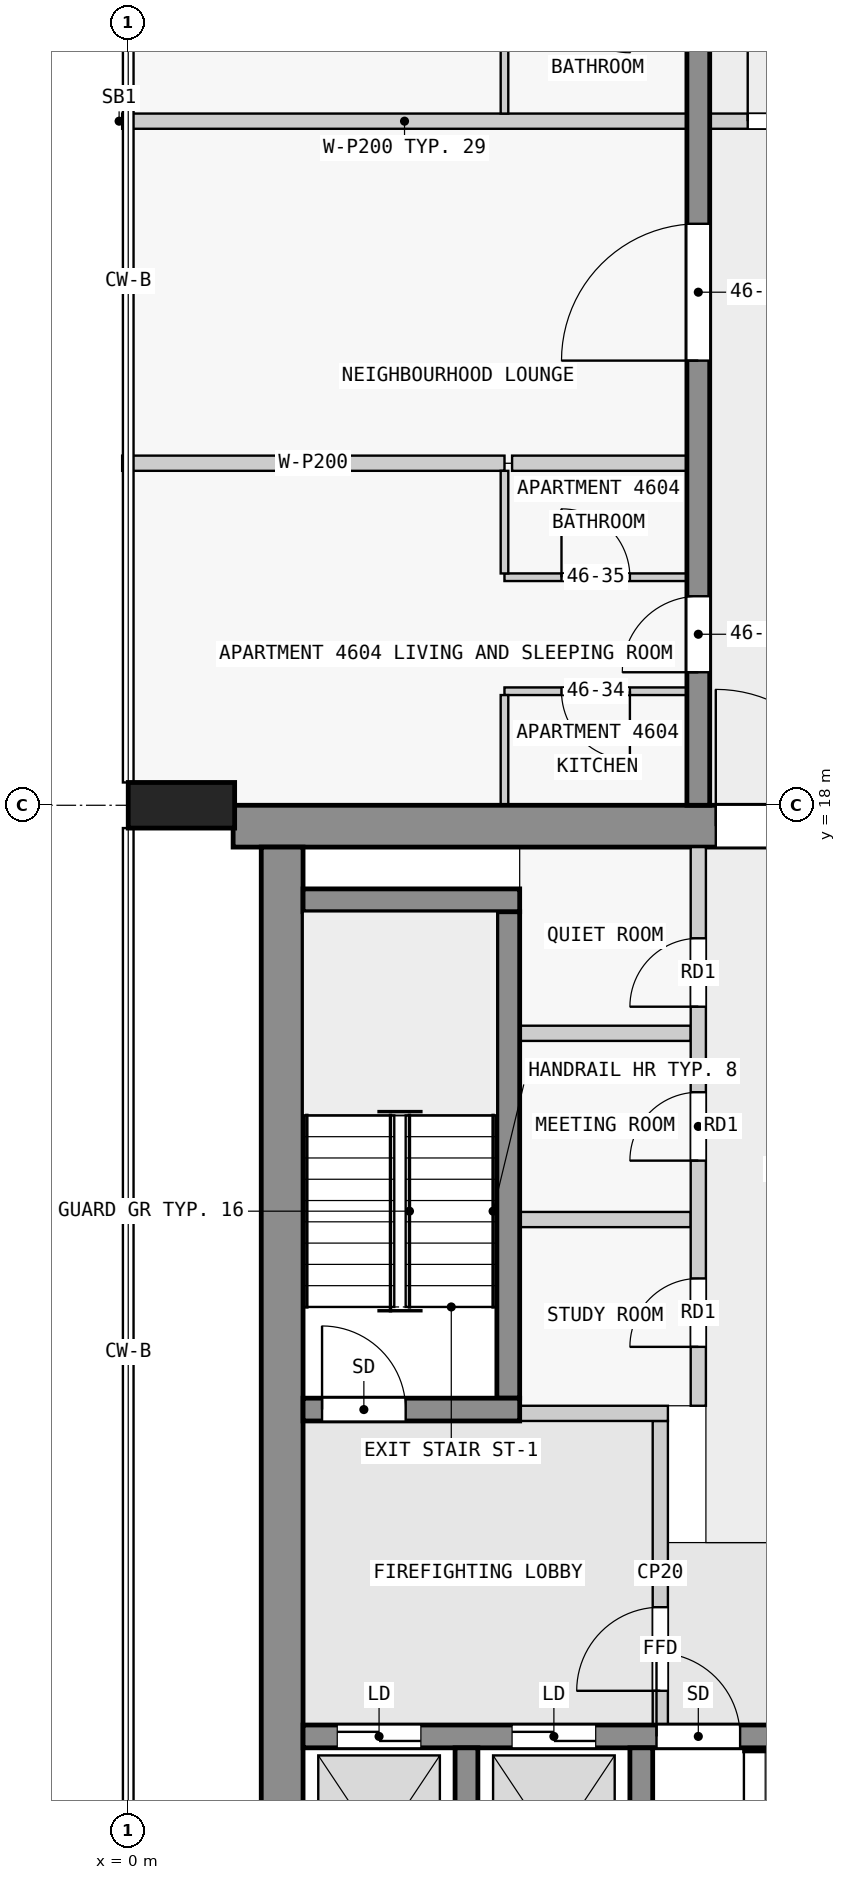
"""IFC4 building model, lengths in metres.
Left out: names, types, materials, properties, quantities, classifications, styles, units other than length and angle.
Written with IfcOpenShell. Run it as: python <this file> out.ifc"""

import sys

from ifc_helpers import new_model, si_unit, direction, frame, frame_2d, origin, origin_2d, place, context, subcontext, project, spatial, rectangle, extrude, element, fill, save


model = new_model("IFC4")
c1 = context("Model", 3, precision=1e-05, world=origin(), true_north=direction((0.0, 1.0)))
c2 = subcontext(c1, "Body", "Model", "MODEL_VIEW")
j1 = project(units=[si_unit("LENGTHUNIT", "METRE"), si_unit("PLANEANGLEUNIT", "RADIAN")], contexts=[c1])
p1 = place(None, origin())
s1 = spatial("IfcSite", under=j1, at=p1, CompositionType="ELEMENT")
p2 = place(p1, origin())
s2 = spatial("IfcBuilding", under=s1, at=p2, CompositionType="ELEMENT")
p3 = place(p2, frame((0.0, 0.0, 177.9)))
s3 = spatial("IfcBuildingStorey", under=s2, at=p3, CompositionType="ELEMENT", Elevation=177.9)
p4 = place(p3, frame((0.7, 18.0, 0.0), z_axis=(0.0, 0.0, 1.0), x_axis=(0.0, 1.0, 0.0)))
e1 = element("IfcColumn", 1, at=p4, inside=s3, PredefinedType="COLUMN", context=c2, shape_type="SweptSolid", body=[
    extrude(rectangle(XDim=0.6, YDim=1.4, at=origin_2d()), origin(), (0.0, 0.0, 1.0), 3.5),
])
p5 = place(p3, frame((1.38, 17.725, 0.0), z_axis=(0.0, 0.0, 1.0), x_axis=(1.0, 0.0, 0.0)))
e2 = element("IfcWall", 2, at=p5, inside=s3, PredefinedType="SHEAR", context=c2, shape_type="SweptSolid", body=[
    extrude(rectangle(XDim=21.12, YDim=0.55, at=frame_2d((10.56, 0.0))), origin(), (0.0, 0.0, 1.0), 3.25),
])
p6 = place(p5, frame((6.35, 0.0, 0.0)))
e3 = element("IfcOpeningElement", 3, at=p6, cuts=e2, PredefinedType="OPENING", context=c2, shape_type="SweptSolid", body=[
    extrude(rectangle(XDim=1.8, YDim=2.1, at=frame_2d((0.9, 1.05))), frame((0.0, 0.285, 0.0), z_axis=(0.0, -1.0, 0.0), x_axis=(1.0, 0.0, 0.0)), (0.0, 0.0, 1.0), 0.57),
])
p7 = place(p3, frame((2.025, 2.5, 0.0), z_axis=(0.0, 0.0, 1.0), x_axis=(0.0, 1.0, 0.0)))
e4 = element("IfcWall", 4, at=p7, inside=s3, PredefinedType="SHEAR", context=c2, shape_type="SweptSolid", body=[
    extrude(rectangle(XDim=14.95, YDim=0.55, at=frame_2d((7.475, 0.0))), origin(), (0.0, 0.0, 1.0), 3.25),
])
for number, where, z_axis, x_axis in (
    (5, (4.45, 2.8, 0.0), (0.0, 0.0, 1.0), (0.0, 1.0, 0.0)),
    (6, (6.75, 2.8, 0.0), (0.0, 0.0, 1.0), (0.0, 1.0, 0.0)),
):
    element("IfcWall", number, at=place(p3, frame(where, z_axis=z_axis, x_axis=x_axis)), inside=s3, PredefinedType="SHEAR", context=c2, shape_type="SweptSolid", body=[
        extrude(rectangle(XDim=2.8, YDim=0.3, at=frame_2d((1.4, 0.0))), origin(), (0.0, 0.0, 1.0), 3.25),
    ])
p8 = place(p3, frame((2.3, 5.75, 0.0), z_axis=(0.0, 0.0, 1.0), x_axis=(1.0, 0.0, 0.0)))
e7 = element("IfcWall", 7, at=p8, inside=s3, PredefinedType="SHEAR", context=c2, shape_type="SweptSolid", body=[
    extrude(rectangle(XDim=18.8, YDim=0.3, at=frame_2d((9.4, 0.0))), origin(), (0.0, 0.0, 1.0), 3.25),
])
p9 = place(p8, frame((4.65, 0.0, 0.0)))
e8 = element("IfcOpeningElement", 8, at=p9, cuts=e7, PredefinedType="OPENING", context=c2, shape_type="SweptSolid", body=[
    extrude(rectangle(XDim=1.1, YDim=2.1, at=frame_2d((0.55, 1.05))), frame((0.0, 0.16, 0.0), z_axis=(0.0, -1.0, 0.0), x_axis=(1.0, 0.0, 0.0)), (0.0, 0.0, 1.0), 0.32),
])
p10 = place(p8, frame((0.45, 0.0, 0.0)))
e9 = element("IfcOpeningElement", 9, at=p10, cuts=e7, PredefinedType="OPENING", context=c2, shape_type="SweptSolid", body=[
    extrude(rectangle(XDim=1.1, YDim=2.1, at=frame_2d((0.55, 1.05))), frame((0.0, 0.16, 0.0), z_axis=(0.0, -1.0, 0.0), x_axis=(1.0, 0.0, 0.0)), (0.0, 0.0, 1.0), 0.32),
])
p11 = place(p8, frame((2.75, 0.0, 0.0)))
e10 = element("IfcOpeningElement", 10, at=p11, cuts=e7, PredefinedType="OPENING", context=c2, shape_type="SweptSolid", body=[
    extrude(rectangle(XDim=1.1, YDim=2.1, at=frame_2d((0.55, 1.05))), frame((0.0, 0.16, 0.0), z_axis=(0.0, -1.0, 0.0), x_axis=(1.0, 0.0, 0.0)), (0.0, 0.0, 1.0), 0.32),
])
p12 = place(p8, frame((13.2, 0.0, 0.0)))
e11 = element("IfcOpeningElement", 11, at=p12, cuts=e7, PredefinedType="OPENING", context=c2, shape_type="SweptSolid", body=[
    extrude(rectangle(XDim=0.9, YDim=2.1, at=frame_2d((0.45, 1.05))), frame((0.0, 0.16, 0.0), z_axis=(0.0, -1.0, 0.0), x_axis=(1.0, 0.0, 0.0)), (0.0, 0.0, 1.0), 0.32),
])
p13 = place(p8, frame((16.95, 0.0, 0.0)))
e12 = element("IfcOpeningElement", 12, at=p13, cuts=e7, PredefinedType="OPENING", context=c2, shape_type="SweptSolid", body=[
    extrude(rectangle(XDim=0.9, YDim=2.1, at=frame_2d((0.45, 1.05))), frame((0.0, 0.16, 0.0), z_axis=(0.0, -1.0, 0.0), x_axis=(1.0, 0.0, 0.0)), (0.0, 0.0, 1.0), 0.32),
])
p14 = place(p3, frame((2.3, 10.05, 0.0), z_axis=(0.0, 0.0, 1.0), x_axis=(1.0, 0.0, 0.0)))
e13 = element("IfcWall", 13, at=p14, inside=s3, PredefinedType="SHEAR", context=c2, shape_type="SweptSolid", body=[
    extrude(rectangle(XDim=2.85, YDim=0.3, at=frame_2d((1.425, 0.0))), origin(), (0.0, 0.0, 1.0), 3.25),
])
p15 = place(p14, frame((0.25, 0.0, 0.0)))
e14 = element("IfcOpeningElement", 14, at=p15, cuts=e13, PredefinedType="OPENING", context=c2, shape_type="SweptSolid", body=[
    extrude(rectangle(XDim=1.1, YDim=2.1, at=frame_2d((0.55, 1.05))), frame((0.0, 0.16, 0.0), z_axis=(0.0, -1.0, 0.0), x_axis=(1.0, 0.0, 0.0)), (0.0, 0.0, 1.0), 0.32),
])
p16 = place(p3, frame((5.0, 10.2, 0.0), z_axis=(0.0, 0.0, 1.0), x_axis=(0.0, 1.0, 0.0)))
e15 = element("IfcWall", 15, at=p16, inside=s3, PredefinedType="SHEAR", context=c2, shape_type="SweptSolid", body=[
    extrude(rectangle(XDim=6.4, YDim=0.3, at=frame_2d((3.2, 0.0))), origin(), (0.0, 0.0, 1.0), 3.25),
])
p17 = place(p3, frame((2.3, 16.75, 0.0), z_axis=(0.0, 0.0, 1.0), x_axis=(1.0, 0.0, 0.0)))
e16 = element("IfcWall", 16, at=p17, inside=s3, PredefinedType="SHEAR", context=c2, shape_type="SweptSolid", body=[
    extrude(rectangle(XDim=2.85, YDim=0.3, at=frame_2d((1.425, 0.0))), origin(), (0.0, 0.0, 1.0), 3.25),
])
p18 = place(p3, frame((7.5, 18.0, 0.0), z_axis=(0.0, 0.0, 1.0), x_axis=(0.0, 1.0, 0.0)))
e17 = element("IfcWall", 17, at=p18, inside=s3, PredefinedType="SHEAR", context=c2, shape_type="SweptSolid", body=[
    extrude(rectangle(XDim=27.0, YDim=0.3, at=frame_2d((13.5, 0.0))), origin(), (0.0, 0.0, 1.0), 3.25),
])
p19 = place(p18, frame((1.75, 0.0, 0.0)))
e18 = element("IfcOpeningElement", 18, at=p19, cuts=e17, PredefinedType="OPENING", context=c2, shape_type="SweptSolid", body=[
    extrude(rectangle(XDim=1.0, YDim=2.1, at=frame_2d((0.5, 1.05))), frame((0.0, 0.16, 0.0), z_axis=(0.0, -1.0, 0.0), x_axis=(1.0, 0.0, 0.0)), (0.0, 0.0, 1.0), 0.32),
])
p20 = place(p18, frame((5.85, 0.0, 0.0)))
e19 = element("IfcOpeningElement", 19, at=p20, cuts=e17, PredefinedType="OPENING", context=c2, shape_type="SweptSolid", body=[
    extrude(rectangle(XDim=1.8, YDim=2.1, at=frame_2d((0.9, 1.05))), frame((0.0, 0.16, 0.0), z_axis=(0.0, -1.0, 0.0), x_axis=(1.0, 0.0, 0.0)), (0.0, 0.0, 1.0), 0.32),
])
p21 = place(p18, frame((13.05, 0.0, 0.0)))
e20 = element("IfcOpeningElement", 20, at=p21, cuts=e17, PredefinedType="OPENING", context=c2, shape_type="SweptSolid", body=[
    extrude(rectangle(XDim=1.0, YDim=2.1, at=frame_2d((0.5, 1.05))), frame((0.0, 0.16, 0.0), z_axis=(0.0, -1.0, 0.0), x_axis=(1.0, 0.0, 0.0)), (0.0, 0.0, 1.0), 0.32),
])
p22 = place(p18, frame((21.35, 0.0, 0.0)))
e21 = element("IfcOpeningElement", 21, at=p22, cuts=e17, PredefinedType="OPENING", context=c2, shape_type="SweptSolid", body=[
    extrude(rectangle(XDim=1.0, YDim=2.1, at=frame_2d((0.5, 1.05))), frame((0.0, 0.16, 0.0), z_axis=(0.0, -1.0, 0.0), x_axis=(1.0, 0.0, 0.0)), (0.0, 0.0, 1.0), 0.32),
])
p23 = place(p3, frame((7.0, 5.9, 0.0), z_axis=(0.0, 0.0, 1.0), x_axis=(0.0, 1.0, 0.0)))
e22 = element("IfcWall", 22, at=p23, inside=s3, PredefinedType="PARTITIONING", context=c2, shape_type="SweptSolid", body=[
    extrude(rectangle(XDim=4.0, YDim=0.2, at=frame_2d((2.0, 0.0))), origin(), (0.0, 0.0, 1.0), 3.25),
])
p24 = place(p23, frame((0.45, 0.0, 0.0)))
e23 = element("IfcOpeningElement", 23, at=p24, cuts=e22, PredefinedType="OPENING", context=c2, shape_type="SweptSolid", body=[
    extrude(rectangle(XDim=1.1, YDim=2.1, at=frame_2d((0.55, 1.05))), frame((0.0, 0.11, 0.0), z_axis=(0.0, -1.0, 0.0), x_axis=(1.0, 0.0, 0.0)), (0.0, 0.0, 1.0), 0.22),
])
p25 = place(p3, frame((5.15, 10.0, 0.0), z_axis=(0.0, 0.0, 1.0), x_axis=(1.0, 0.0, 0.0)))
e24 = element("IfcWall", 24, at=p25, inside=s3, PredefinedType="PARTITIONING", context=c2, shape_type="SweptSolid", body=[
    extrude(rectangle(XDim=1.95, YDim=0.2, at=frame_2d((0.975, 0.0))), origin(), (0.0, 0.0, 1.0), 3.25),
])
p26 = place(p3, frame((7.5, 10.1, 0.0), z_axis=(0.0, 0.0, 1.0), x_axis=(0.0, 1.0, 0.0)))
e25 = element("IfcWall", 25, at=p26, inside=s3, PredefinedType="PARTITIONING", context=c2, shape_type="SweptSolid", body=[
    extrude(rectangle(XDim=7.35, YDim=0.2, at=frame_2d((3.675, 0.0))), origin(), (0.0, 0.0, 1.0), 3.25),
])
p27 = place(p26, frame((0.775, 0.0, 0.0)))
e26 = element("IfcOpeningElement", 26, at=p27, cuts=e25, PredefinedType="OPENING", context=c2, shape_type="SweptSolid", body=[
    extrude(rectangle(XDim=0.9, YDim=2.1, at=frame_2d((0.45, 1.05))), frame((0.0, 0.11, 0.0), z_axis=(0.0, -1.0, 0.0), x_axis=(1.0, 0.0, 0.0)), (0.0, 0.0, 1.0), 0.22),
])
p28 = place(p26, frame((3.225, 0.0, 0.0)))
e27 = element("IfcOpeningElement", 27, at=p28, cuts=e25, PredefinedType="OPENING", context=c2, shape_type="SweptSolid", body=[
    extrude(rectangle(XDim=0.9, YDim=2.1, at=frame_2d((0.45, 1.05))), frame((0.0, 0.11, 0.0), z_axis=(0.0, -1.0, 0.0), x_axis=(1.0, 0.0, 0.0)), (0.0, 0.0, 1.0), 0.22),
])
p29 = place(p26, frame((5.25, 0.0, 0.0)))
e28 = element("IfcOpeningElement", 28, at=p29, cuts=e25, PredefinedType="OPENING", context=c2, shape_type="SweptSolid", body=[
    extrude(rectangle(XDim=0.9, YDim=2.1, at=frame_2d((0.45, 1.05))), frame((0.0, 0.11, 0.0), z_axis=(0.0, -1.0, 0.0), x_axis=(1.0, 0.0, 0.0)), (0.0, 0.0, 1.0), 0.22),
])
for number, where, z_axis, x_axis in (
    (29, (5.15, 12.55, 0.0), (0.0, 0.0, 1.0), (1.0, 0.0, 0.0)),
    (30, (5.15, 15.0, 0.0), (0.0, 0.0, 1.0), (1.0, 0.0, 0.0)),
):
    element("IfcWall", number, at=place(p3, frame(where, z_axis=z_axis, x_axis=x_axis)), inside=s3, PredefinedType="PARTITIONING", context=c2, shape_type="SweptSolid", body=[
        extrude(rectangle(XDim=2.25, YDim=0.2, at=frame_2d((1.125, 0.0))), origin(), (0.0, 0.0, 1.0), 3.25),
    ])
p30 = place(p3, frame((7.35, 19.5, 0.0), z_axis=(0.0, 0.0, 1.0), x_axis=(-1.0, 0.0, 0.0)))
e31 = element("IfcWall", 31, at=p30, inside=s3, PredefinedType="PARTITIONING", context=c2, shape_type="SweptSolid", body=[
    extrude(rectangle(XDim=2.4, YDim=0.1, at=frame_2d((1.2, 0.0))), origin(), (0.0, 0.0, 1.0), 3.25),
])
p31 = place(p30, frame((0.75, 0.0, 0.0)))
e32 = element("IfcOpeningElement", 32, at=p31, cuts=e31, PredefinedType="OPENING", context=c2, shape_type="SweptSolid", body=[
    extrude(rectangle(XDim=0.9, YDim=2.1, at=frame_2d((0.45, 1.05))), frame((0.0, 0.06, 0.0), z_axis=(0.0, -1.0, 0.0), x_axis=(1.0, 0.0, 0.0)), (0.0, 0.0, 1.0), 0.12),
])
p32 = place(p3, frame((4.95, 21.0, 0.0), z_axis=(0.0, 0.0, 1.0), x_axis=(1.0, 0.0, 0.0)))
e33 = element("IfcWall", 33, at=p32, inside=s3, PredefinedType="PARTITIONING", context=c2, shape_type="SweptSolid", body=[
    extrude(rectangle(XDim=2.4, YDim=0.1, at=frame_2d((1.2, 0.0))), origin(), (0.0, 0.0, 1.0), 3.25),
])
p33 = place(p32, frame((0.75, 0.0, 0.0)))
e34 = element("IfcOpeningElement", 34, at=p33, cuts=e33, PredefinedType="OPENING", context=c2, shape_type="SweptSolid", body=[
    extrude(rectangle(XDim=0.9, YDim=2.1, at=frame_2d((0.45, 1.05))), frame((0.0, 0.06, 0.0), z_axis=(0.0, -1.0, 0.0), x_axis=(1.0, 0.0, 0.0)), (0.0, 0.0, 1.0), 0.12),
])
p34 = place(p3, frame((7.35, 22.5, 0.0), z_axis=(0.0, 0.0, 1.0), x_axis=(-1.0, 0.0, 0.0)))
e35 = element("IfcWall", 35, at=p34, inside=s3, PredefinedType="PARTITIONING", context=c2, shape_type="SweptSolid", body=[
    extrude(rectangle(XDim=2.3, YDim=0.2, at=frame_2d((1.15, 0.0))), origin(), (0.0, 0.0, 1.0), 3.25),
])
p35 = place(p3, frame((-0.08, 22.5, 0.0), z_axis=(0.0, 0.0, 1.0), x_axis=(1.0, 0.0, 0.0)))
e36 = element("IfcWall", 36, at=p35, inside=s3, PredefinedType="PARTITIONING", context=c2, shape_type="SweptSolid", body=[
    extrude(rectangle(XDim=5.03, YDim=0.2, at=frame_2d((2.515, 0.0))), origin(), (0.0, 0.0, 1.0), 3.25),
])
p36 = place(p3, frame((7.35, 27.0, 0.0), z_axis=(0.0, 0.0, 1.0), x_axis=(-1.0, 0.0, 0.0)))
e37 = element("IfcWall", 37, at=p36, inside=s3, PredefinedType="PARTITIONING", context=c2, shape_type="SweptSolid", body=[
    extrude(rectangle(XDim=7.43, YDim=0.2, at=frame_2d((3.715, 0.0))), origin(), (0.0, 0.0, 1.0), 3.25),
])
p37 = place(p3, frame((4.95, 19.45, 0.0), z_axis=(0.0, 0.0, 1.0), x_axis=(0.0, -1.0, 0.0)))
e38 = element("IfcWall", 38, at=p37, inside=s3, PredefinedType="PARTITIONING", context=c2, shape_type="SweptSolid", body=[
    extrude(rectangle(XDim=1.45, YDim=0.1, at=frame_2d((0.725, 0.0))), origin(), (0.0, 0.0, 1.0), 3.25),
])
p38 = place(p3, frame((4.95, 22.4, 0.0), z_axis=(0.0, 0.0, 1.0), x_axis=(0.0, -1.0, 0.0)))
e39 = element("IfcWall", 39, at=p38, inside=s3, PredefinedType="PARTITIONING", context=c2, shape_type="SweptSolid", body=[
    extrude(rectangle(XDim=1.35, YDim=0.1, at=frame_2d((0.675, 0.0))), origin(), (0.0, 0.0, 1.0), 3.25),
])
p39 = place(p3, frame((4.95, 28.75, 0.0), z_axis=(0.0, 0.0, 1.0), x_axis=(0.0, -1.0, 0.0)))
e40 = element("IfcWall", 40, at=p39, inside=s3, PredefinedType="PARTITIONING", context=c2, shape_type="SweptSolid", body=[
    extrude(rectangle(XDim=1.65, YDim=0.1, at=frame_2d((0.825, 0.0))), origin(), (0.0, 0.0, 1.0), 3.25),
])
p40 = place(p3, frame((7.45, 27.0, 0.0), z_axis=(0.0, 0.0, 1.0), x_axis=(1.0, 0.0, 0.0)))
e41 = element("IfcWall", 41, at=p40, inside=s3, PredefinedType="PARTITIONING", context=c2, shape_type="SweptSolid", body=[
    extrude(rectangle(XDim=3.2, YDim=0.2, at=frame_2d((1.6, 0.0))), origin(), (0.0, 0.0, 1.0), 3.25),
])
p41 = place(p40, frame((0.7, 0.0, 0.0)))
e42 = element("IfcOpeningElement", 42, at=p41, cuts=e41, PredefinedType="OPENING", context=c2, shape_type="SweptSolid", body=[
    extrude(rectangle(XDim=1.8, YDim=2.1, at=frame_2d((0.9, 1.05))), frame((0.0, 0.11, 0.0), z_axis=(0.0, -1.0, 0.0), x_axis=(1.0, 0.0, 0.0)), (0.0, 0.0, 1.0), 0.22),
])
p42 = place(p24, origin())
e43 = element("IfcDoor", 43, at=p42, inside=s3, OperationType="SINGLE_SWING_LEFT", PredefinedType="DOOR", context=c2, shape_type="SweptSolid", body=[
    extrude(rectangle(XDim=1.1, YDim=2.1, at=frame_2d((0.55, 1.05))), frame((0.0, 0.025, 0.0), z_axis=(0.0, -1.0, 0.0), x_axis=(1.0, 0.0, 0.0)), (0.0, 0.0, 1.0), 0.05),
])
fill(e23, e43)
p43 = place(p15, origin())
e44 = element("IfcDoor", 44, at=p43, inside=s3, OperationType="SINGLE_SWING_RIGHT", PredefinedType="DOOR", context=c2, shape_type="SweptSolid", body=[
    extrude(rectangle(XDim=1.1, YDim=2.1, at=frame_2d((0.55, 1.05))), frame((0.0, 0.025, 0.0), z_axis=(0.0, -1.0, 0.0), x_axis=(1.0, 0.0, 0.0)), (0.0, 0.0, 1.0), 0.05),
])
fill(e14, e44)
p44 = place(p9, origin())
e45 = element("IfcDoor", 45, at=p44, inside=s3, OperationType="SINGLE_SWING_LEFT", PredefinedType="DOOR", context=c2, shape_type="SweptSolid", body=[
    extrude(rectangle(XDim=1.1, YDim=2.1, at=frame_2d((0.55, 1.05))), frame((0.0, 0.025, 0.0), z_axis=(0.0, -1.0, 0.0), x_axis=(1.0, 0.0, 0.0)), (0.0, 0.0, 1.0), 0.05),
])
fill(e8, e45)
p45 = place(p10, origin())
e46 = element("IfcDoor", 46, at=p45, inside=s3, OperationType="DOUBLE_DOOR_SLIDING", PredefinedType="DOOR", context=c2, shape_type="SweptSolid", body=[
    extrude(rectangle(XDim=1.1, YDim=2.1, at=frame_2d((0.55, 1.05))), frame((0.0, 0.025, 0.0), z_axis=(0.0, -1.0, 0.0), x_axis=(1.0, 0.0, 0.0)), (0.0, 0.0, 1.0), 0.05),
])
fill(e9, e46)
p46 = place(p11, origin())
e47 = element("IfcDoor", 47, at=p46, inside=s3, OperationType="DOUBLE_DOOR_SLIDING", PredefinedType="DOOR", context=c2, shape_type="SweptSolid", body=[
    extrude(rectangle(XDim=1.1, YDim=2.1, at=frame_2d((0.55, 1.05))), frame((0.0, 0.025, 0.0), z_axis=(0.0, -1.0, 0.0), x_axis=(1.0, 0.0, 0.0)), (0.0, 0.0, 1.0), 0.05),
])
fill(e10, e47)
p47 = place(p6, origin())
e48 = element("IfcDoor", 48, at=p47, inside=s3, OperationType="DOUBLE_DOOR_SINGLE_SWING", PredefinedType="DOOR", context=c2, shape_type="SweptSolid", body=[
    extrude(rectangle(XDim=1.8, YDim=2.1, at=frame_2d((0.9, 1.05))), frame((0.0, 0.025, 0.0), z_axis=(0.0, -1.0, 0.0), x_axis=(1.0, 0.0, 0.0)), (0.0, 0.0, 1.0), 0.05),
])
fill(e3, e48)
p48 = place(p27, origin())
e49 = element("IfcDoor", 49, at=p48, inside=s3, OperationType="SINGLE_SWING_RIGHT", PredefinedType="DOOR", context=c2, shape_type="SweptSolid", body=[
    extrude(rectangle(XDim=0.9, YDim=2.1, at=frame_2d((0.45, 1.05))), frame((0.0, 0.025, 0.0), z_axis=(0.0, -1.0, 0.0), x_axis=(1.0, 0.0, 0.0)), (0.0, 0.0, 1.0), 0.05),
])
fill(e26, e49)
p49 = place(p28, origin())
e50 = element("IfcDoor", 50, at=p49, inside=s3, OperationType="SINGLE_SWING_RIGHT", PredefinedType="DOOR", context=c2, shape_type="SweptSolid", body=[
    extrude(rectangle(XDim=0.9, YDim=2.1, at=frame_2d((0.45, 1.05))), frame((0.0, 0.025, 0.0), z_axis=(0.0, -1.0, 0.0), x_axis=(1.0, 0.0, 0.0)), (0.0, 0.0, 1.0), 0.05),
])
fill(e27, e50)
p50 = place(p29, origin())
e51 = element("IfcDoor", 51, at=p50, inside=s3, OperationType="SINGLE_SWING_RIGHT", PredefinedType="DOOR", context=c2, shape_type="SweptSolid", body=[
    extrude(rectangle(XDim=0.9, YDim=2.1, at=frame_2d((0.45, 1.05))), frame((0.0, 0.025, 0.0), z_axis=(0.0, -1.0, 0.0), x_axis=(1.0, 0.0, 0.0)), (0.0, 0.0, 1.0), 0.05),
])
fill(e28, e51)
p51 = place(p19, origin())
e52 = element("IfcDoor", 52, at=p51, inside=s3, OperationType="SINGLE_SWING_LEFT", PredefinedType="DOOR", context=c2, shape_type="SweptSolid", body=[
    extrude(rectangle(XDim=1.0, YDim=2.1, at=frame_2d((0.5, 1.05))), frame((0.0, 0.025, 0.0), z_axis=(0.0, -1.0, 0.0), x_axis=(1.0, 0.0, 0.0)), (0.0, 0.0, 1.0), 0.05),
])
fill(e18, e52)
p52 = place(p20, origin())
e53 = element("IfcDoor", 53, at=p52, inside=s3, OperationType="SINGLE_SWING_LEFT", PredefinedType="DOOR", context=c2, shape_type="SweptSolid", body=[
    extrude(rectangle(XDim=1.8, YDim=2.1, at=frame_2d((0.9, 1.05))), frame((0.0, 0.025, 0.0), z_axis=(0.0, -1.0, 0.0), x_axis=(1.0, 0.0, 0.0)), (0.0, 0.0, 1.0), 0.05),
])
fill(e19, e53)
p53 = place(p41, origin())
e54 = element("IfcDoor", 54, at=p53, inside=s3, OperationType="SINGLE_SWING_LEFT", PredefinedType="DOOR", context=c2, shape_type="SweptSolid", body=[
    extrude(rectangle(XDim=1.8, YDim=2.1, at=frame_2d((0.9, 1.05))), frame((0.0, 0.025, 0.0), z_axis=(0.0, -1.0, 0.0), x_axis=(1.0, 0.0, 0.0)), (0.0, 0.0, 1.0), 0.05),
])
fill(e42, e54)
p54 = place(p31, origin())
e55 = element("IfcDoor", 55, at=p54, inside=s3, OperationType="SINGLE_SWING_RIGHT", PredefinedType="DOOR", context=c2, shape_type="SweptSolid", body=[
    extrude(rectangle(XDim=0.9, YDim=2.1, at=frame_2d((0.45, 1.05))), frame((0.0, 0.025, 0.0), z_axis=(0.0, -1.0, 0.0), x_axis=(1.0, 0.0, 0.0)), (0.0, 0.0, 1.0), 0.05),
])
fill(e32, e55)
p55 = place(p33, origin())
e56 = element("IfcDoor", 56, at=p55, inside=s3, OperationType="SINGLE_SWING_RIGHT", PredefinedType="DOOR", context=c2, shape_type="SweptSolid", body=[
    extrude(rectangle(XDim=0.9, YDim=2.1, at=frame_2d((0.45, 1.05))), frame((0.0, 0.025, 0.0), z_axis=(0.0, -1.0, 0.0), x_axis=(1.0, 0.0, 0.0)), (0.0, 0.0, 1.0), 0.05),
])
fill(e34, e56)
save(model, sys.argv[1])
